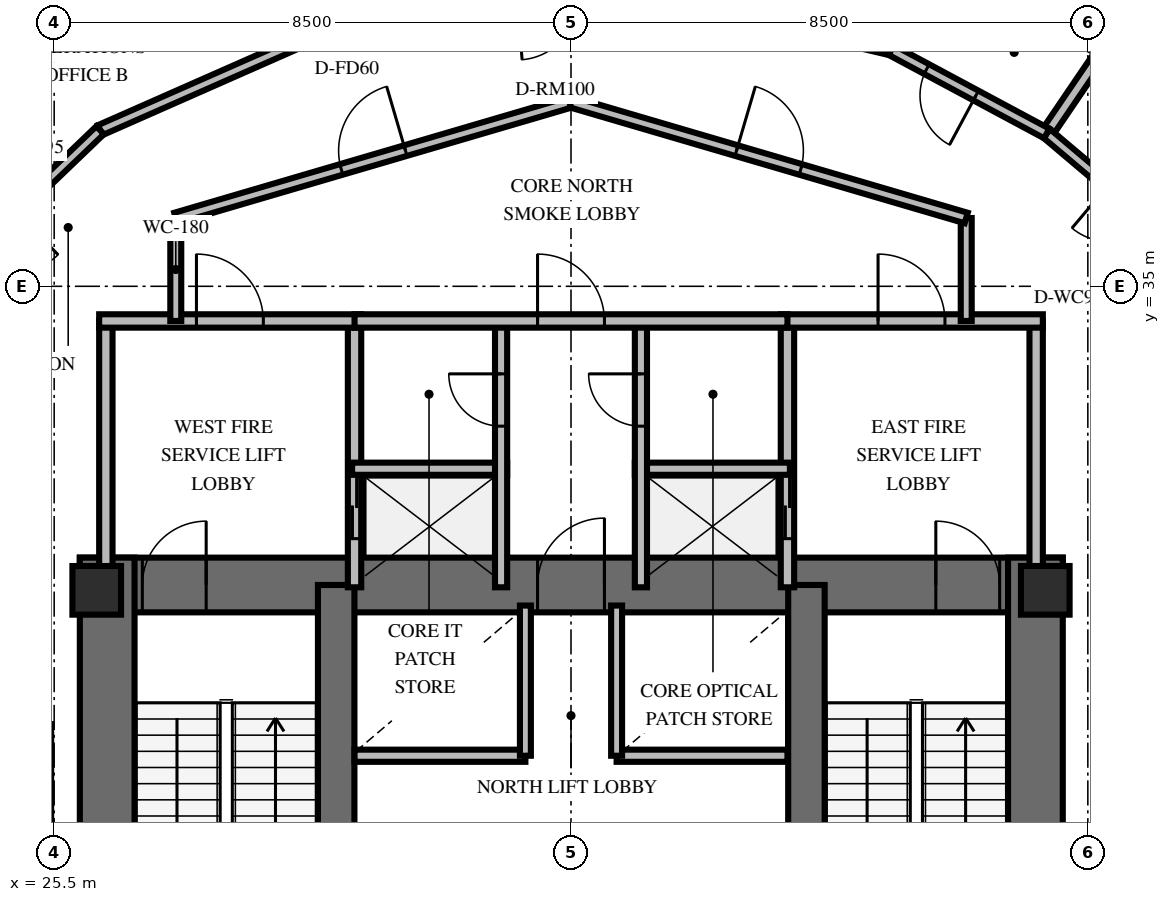
"""IFC4 building model, lengths in metres.
Left out: names, types, materials, properties, quantities, classifications, styles, units other than length and angle.
Written with IfcOpenShell. Run it as: python <this file> out.ifc"""

import sys

from ifc_helpers import new_model, si_unit, direction, frame, frame_2d, origin, origin_2d, place, context, subcontext, project, spatial, rectangle, extrude, element, fill, save


model = new_model("IFC4")
c1 = context("Model", 3, precision=1e-05, world=origin(), true_north=direction((0.0, 1.0)))
c2 = subcontext(c1, "Body", "Model", "MODEL_VIEW")
j1 = project(units=[si_unit("LENGTHUNIT", "METRE"), si_unit("PLANEANGLEUNIT", "RADIAN")], contexts=[c1])
p1 = place(None, origin())
s1 = spatial("IfcSite", under=j1, at=p1, CompositionType="ELEMENT")
p2 = place(p1, origin())
s2 = spatial("IfcBuilding", under=s1, at=p2, CompositionType="ELEMENT")
p3 = place(p2, frame((0.0, 0.0, 46.8)))
s3 = spatial("IfcBuildingStorey", under=s2, at=p3, CompositionType="ELEMENT", Elevation=46.8)
p4 = place(p3, frame((25.922, 30.088, 0.0), z_axis=(0.0, 0.0, 1.0), x_axis=(1.0, 0.0, 0.0)))
e1 = element("IfcWall", 1, at=p4, inside=s3, PredefinedType="SHEAR", context=c2, shape_type="SweptSolid", body=[
    extrude(rectangle(XDim=16.166, YDim=0.9, at=frame_2d((8.083, 0.0))), origin(), (0.0, 0.0, 1.0), 4.2),
])
p5 = place(p4, frame((1.028, 0.0, 0.0)))
e2 = element("IfcOpeningElement", 2, at=p5, cuts=e1, PredefinedType="OPENING", context=c2, shape_type="SweptSolid", body=[
    extrude(rectangle(XDim=1.05, YDim=2.15, at=frame_2d((0.525, 1.075))), frame((0.0, 0.46, 0.0), z_axis=(0.0, -1.0, 0.0), x_axis=(1.0, 0.0, 0.0)), (0.0, 0.0, 1.0), 0.92),
])
p6 = place(p4, frame((14.078, 0.0, 0.0)))
e3 = element("IfcOpeningElement", 3, at=p6, cuts=e1, PredefinedType="OPENING", context=c2, shape_type="SweptSolid", body=[
    extrude(rectangle(XDim=1.05, YDim=2.15, at=frame_2d((0.525, 1.075))), frame((0.0, 0.46, 0.0), z_axis=(0.0, -1.0, 0.0), x_axis=(1.0, 0.0, 0.0)), (0.0, 0.0, 1.0), 0.92),
])
p7 = place(p4, frame((7.528, 0.0, 0.0)))
e4 = element("IfcOpeningElement", 4, at=p7, cuts=e1, PredefinedType="OPENING", context=c2, shape_type="SweptSolid", body=[
    extrude(rectangle(XDim=1.1, YDim=2.15, at=frame_2d((0.55, 1.075))), frame((0.0, 0.46, 0.0), z_axis=(0.0, -1.0, 0.0), x_axis=(1.0, 0.0, 0.0)), (0.0, 0.0, 1.0), 0.92),
])
for number, where, z_axis, x_axis in (
    (5, (26.372, 19.662, 0.0), (0.0, 0.0, 1.0), (0.0, 1.0, 0.0)),
    (6, (41.638, 19.662, 0.0), (0.0, 0.0, 1.0), (0.0, 1.0, 0.0)),
):
    element("IfcWall", number, at=place(p3, frame(where, z_axis=z_axis, x_axis=x_axis)), inside=s3, PredefinedType="SHEAR", context=c2, shape_type="SweptSolid", body=[
        extrude(rectangle(XDim=10.876, YDim=0.9, at=frame_2d((5.438, 0.0))), origin(), (0.0, 0.0, 1.0), 4.2),
    ])
for number, where, z_axis, x_axis in (
    (7, (30.138, 20.112, 0.0), (0.0, 0.0, 1.0), (0.0, 1.0, 0.0)),
    (8, (37.872, 20.112, 0.0), (0.0, 0.0, 1.0), (0.0, 1.0, 0.0)),
):
    element("IfcWall", number, at=place(p3, frame(where, z_axis=z_axis, x_axis=x_axis)), inside=s3, PredefinedType="SHEAR", context=c2, shape_type="SweptSolid", body=[
        extrude(rectangle(XDim=9.976, YDim=0.6, at=frame_2d((4.988, 0.0))), origin(), (0.0, 0.0, 1.0), 4.2),
    ])
for number, where, z_axis, x_axis in (
    (9, (26.2, 30.0, 0.0), (0.0, 0.0, 1.0), (1.0, 0.0, 0.0)),
    (10, (41.8, 30.0, 0.0), (0.0, 0.0, 1.0), (1.0, 0.0, 0.0)),
):
    element("IfcColumn", number, at=place(p3, frame(where, z_axis=z_axis, x_axis=x_axis)), inside=s3, PredefinedType="PILASTER", context=c2, shape_type="SweptSolid", body=[
        extrude(rectangle(XDim=0.8, YDim=0.8, at=origin_2d()), origin(), (0.0, 0.0, 1.0), 4.2),
    ])
p8 = place(p3, frame((26.35, 30.05, 0.0), z_axis=(0.0, 0.0, 1.0), x_axis=(0.0, 1.0, 0.0)))
e11 = element("IfcWall", 11, at=p8, inside=s3, PredefinedType="SOLIDWALL", context=c2, shape_type="SweptSolid", body=[
    extrude(rectangle(XDim=4.38, YDim=0.22, at=frame_2d((2.19, 0.0))), origin(), (0.0, 0.0, 1.0), 3.0),
])
p9 = place(p3, frame((30.44, 30.05, 0.0), z_axis=(0.0, 0.0, 1.0), x_axis=(0.0, 1.0, 0.0)))
e12 = element("IfcWall", 12, at=p9, inside=s3, PredefinedType="SOLIDWALL", context=c2, shape_type="SweptSolid", body=[
    extrude(rectangle(XDim=4.38, YDim=0.22, at=frame_2d((2.19, 0.0))), origin(), (0.0, 0.0, 1.0), 3.0),
])
p10 = place(p9, frame((0.8, 0.0, 0.0)))
e13 = element("IfcOpeningElement", 13, at=p10, cuts=e12, PredefinedType="OPENING", context=c2, shape_type="SweptSolid", body=[
    extrude(rectangle(XDim=1.05, YDim=2.1, at=frame_2d((0.525, 1.05))), frame((0.0, 0.12, 0.0), z_axis=(0.0, -1.0, 0.0), x_axis=(1.0, 0.0, 0.0)), (0.0, 0.0, 1.0), 0.24),
])
p11 = place(p3, frame((26.24, 34.43, 0.0), z_axis=(0.0, 0.0, 1.0), x_axis=(1.0, 0.0, 0.0)))
e14 = element("IfcWall", 14, at=p11, inside=s3, PredefinedType="SOLIDWALL", context=c2, shape_type="SweptSolid", body=[
    extrude(rectangle(XDim=4.31, YDim=0.22, at=frame_2d((2.155, 0.0))), origin(), (0.0, 0.0, 1.0), 3.0),
])
p12 = place(p11, frame((1.6, 0.0, 0.0)))
e15 = element("IfcOpeningElement", 15, at=p12, cuts=e14, PredefinedType="OPENING", context=c2, shape_type="SweptSolid", body=[
    extrude(rectangle(XDim=1.1, YDim=2.15, at=frame_2d((0.55, 1.075))), frame((0.0, 0.12, 0.0), z_axis=(0.0, -1.0, 0.0), x_axis=(1.0, 0.0, 0.0)), (0.0, 0.0, 1.0), 0.24),
])
p13 = place(p3, frame((30.4, 32.0, 0.0), z_axis=(0.0, 0.0, 1.0), x_axis=(1.0, 0.0, 0.0)))
e16 = element("IfcWall", 16, at=p13, inside=s3, PredefinedType="SOLIDWALL", context=c2, shape_type="SweptSolid", body=[
    extrude(rectangle(XDim=2.55, YDim=0.2, at=frame_2d((1.275, 0.0))), origin(), (0.0, 0.0, 1.0), 3.0),
])
p14 = place(p3, frame((32.85, 30.05, 0.0), z_axis=(0.0, 0.0, 1.0), x_axis=(0.0, 1.0, 0.0)))
e17 = element("IfcWall", 17, at=p14, inside=s3, PredefinedType="SOLIDWALL", context=c2, shape_type="SweptSolid", body=[
    extrude(rectangle(XDim=4.38, YDim=0.2, at=frame_2d((2.19, 0.0))), origin(), (0.0, 0.0, 1.0), 3.0),
])
p15 = place(p14, frame((2.65, 0.0, 0.0)))
e18 = element("IfcOpeningElement", 18, at=p15, cuts=e17, PredefinedType="OPENING", context=c2, shape_type="SweptSolid", body=[
    extrude(rectangle(XDim=0.86, YDim=2.05, at=frame_2d((0.43, 1.025))), frame((0.0, 0.11, 0.0), z_axis=(0.0, -1.0, 0.0), x_axis=(1.0, 0.0, 0.0)), (0.0, 0.0, 1.0), 0.22),
])
p16 = place(p3, frame((37.56, 30.05, 0.0), z_axis=(0.0, 0.0, 1.0), x_axis=(0.0, 1.0, 0.0)))
e19 = element("IfcWall", 19, at=p16, inside=s3, PredefinedType="SOLIDWALL", context=c2, shape_type="SweptSolid", body=[
    extrude(rectangle(XDim=4.38, YDim=0.22, at=frame_2d((2.19, 0.0))), origin(), (0.0, 0.0, 1.0), 3.0),
])
p17 = place(p16, frame((0.8, 0.0, 0.0)))
e20 = element("IfcOpeningElement", 20, at=p17, cuts=e19, PredefinedType="OPENING", context=c2, shape_type="SweptSolid", body=[
    extrude(rectangle(XDim=1.05, YDim=2.1, at=frame_2d((0.525, 1.05))), frame((0.0, 0.12, 0.0), z_axis=(0.0, -1.0, 0.0), x_axis=(1.0, 0.0, 0.0)), (0.0, 0.0, 1.0), 0.24),
])
p18 = place(p3, frame((41.65, 30.05, 0.0), z_axis=(0.0, 0.0, 1.0), x_axis=(0.0, 1.0, 0.0)))
e21 = element("IfcWall", 21, at=p18, inside=s3, PredefinedType="SOLIDWALL", context=c2, shape_type="SweptSolid", body=[
    extrude(rectangle(XDim=4.38, YDim=0.22, at=frame_2d((2.19, 0.0))), origin(), (0.0, 0.0, 1.0), 3.0),
])
p19 = place(p3, frame((37.45, 34.43, 0.0), z_axis=(0.0, 0.0, 1.0), x_axis=(1.0, 0.0, 0.0)))
e22 = element("IfcWall", 22, at=p19, inside=s3, PredefinedType="SOLIDWALL", context=c2, shape_type="SweptSolid", body=[
    extrude(rectangle(XDim=4.31, YDim=0.22, at=frame_2d((2.155, 0.0))), origin(), (0.0, 0.0, 1.0), 3.0),
])
p20 = place(p19, frame((1.6, 0.0, 0.0)))
e23 = element("IfcOpeningElement", 23, at=p20, cuts=e22, PredefinedType="OPENING", context=c2, shape_type="SweptSolid", body=[
    extrude(rectangle(XDim=1.1, YDim=2.15, at=frame_2d((0.55, 1.075))), frame((0.0, 0.12, 0.0), z_axis=(0.0, -1.0, 0.0), x_axis=(1.0, 0.0, 0.0)), (0.0, 0.0, 1.0), 0.24),
])
p21 = place(p3, frame((35.05, 32.0, 0.0), z_axis=(0.0, 0.0, 1.0), x_axis=(1.0, 0.0, 0.0)))
e24 = element("IfcWall", 24, at=p21, inside=s3, PredefinedType="SOLIDWALL", context=c2, shape_type="SweptSolid", body=[
    extrude(rectangle(XDim=2.55, YDim=0.2, at=frame_2d((1.275, 0.0))), origin(), (0.0, 0.0, 1.0), 3.0),
])
p22 = place(p3, frame((35.15, 30.05, 0.0), z_axis=(0.0, 0.0, 1.0), x_axis=(0.0, 1.0, 0.0)))
e25 = element("IfcWall", 25, at=p22, inside=s3, PredefinedType="SOLIDWALL", context=c2, shape_type="SweptSolid", body=[
    extrude(rectangle(XDim=4.38, YDim=0.2, at=frame_2d((2.19, 0.0))), origin(), (0.0, 0.0, 1.0), 3.0),
])
p23 = place(p22, frame((2.65, 0.0, 0.0)))
e26 = element("IfcOpeningElement", 26, at=p23, cuts=e25, PredefinedType="OPENING", context=c2, shape_type="SweptSolid", body=[
    extrude(rectangle(XDim=0.86, YDim=2.05, at=frame_2d((0.43, 1.025))), frame((0.0, 0.11, 0.0), z_axis=(0.0, -1.0, 0.0), x_axis=(1.0, 0.0, 0.0)), (0.0, 0.0, 1.0), 0.22),
])
p24 = place(p3, frame((30.44, 34.43, 0.0), z_axis=(0.0, 0.0, 1.0), x_axis=(1.0, 0.0, 0.0)))
e27 = element("IfcWall", 27, at=p24, inside=s3, PredefinedType="SOLIDWALL", context=c2, shape_type="SweptSolid", body=[
    extrude(rectangle(XDim=7.12, YDim=0.22, at=frame_2d((3.56, 0.0))), origin(), (0.0, 0.0, 1.0), 3.0),
])
p25 = place(p24, frame((3.01, 0.0, 0.0)))
e28 = element("IfcOpeningElement", 28, at=p25, cuts=e27, PredefinedType="OPENING", context=c2, shape_type="SweptSolid", body=[
    extrude(rectangle(XDim=1.1, YDim=2.15, at=frame_2d((0.55, 1.075))), frame((0.0, 0.12, 0.0), z_axis=(0.0, -1.0, 0.0), x_axis=(1.0, 0.0, 0.0)), (0.0, 0.0, 1.0), 0.24),
])
p26 = place(p3, frame((30.44, 27.28, 0.0), z_axis=(0.0, 0.0, 1.0), x_axis=(1.0, 0.0, 0.0)))
e29 = element("IfcWall", 29, at=p26, inside=s3, PredefinedType="SOLIDWALL", context=c2, shape_type="SweptSolid", body=[
    extrude(rectangle(XDim=2.81, YDim=0.2, at=frame_2d((1.405, 0.0))), origin(), (0.0, 0.0, 1.0), 3.0),
])
p27 = place(p3, frame((33.25, 27.28, 0.0), z_axis=(0.0, 0.0, 1.0), x_axis=(0.0, 1.0, 0.0)))
e30 = element("IfcWall", 30, at=p27, inside=s3, PredefinedType="SOLIDWALL", context=c2, shape_type="SweptSolid", body=[
    extrude(rectangle(XDim=2.47, YDim=0.18, at=frame_2d((1.235, 0.0))), origin(), (0.0, 0.0, 1.0), 3.0),
])
p28 = place(p3, frame((34.75, 27.28, 0.0), z_axis=(0.0, 0.0, 1.0), x_axis=(1.0, 0.0, 0.0)))
e31 = element("IfcWall", 31, at=p28, inside=s3, PredefinedType="SOLIDWALL", context=c2, shape_type="SweptSolid", body=[
    extrude(rectangle(XDim=2.81, YDim=0.2, at=frame_2d((1.405, 0.0))), origin(), (0.0, 0.0, 1.0), 3.0),
])
p29 = place(p3, frame((34.75, 27.28, 0.0), z_axis=(0.0, 0.0, 1.0), x_axis=(0.0, 1.0, 0.0)))
e32 = element("IfcWall", 32, at=p29, inside=s3, PredefinedType="SOLIDWALL", context=c2, shape_type="SweptSolid", body=[
    extrude(rectangle(XDim=2.47, YDim=0.18, at=frame_2d((1.235, 0.0))), origin(), (0.0, 0.0, 1.0), 3.0),
])
for number, where, z_axis, x_axis in (
    (33, (27.5, 34.43, 0.0), (0.0, 0.0, 1.0), (0.0, 1.0, 0.0)),
    (34, (40.5, 36.123, 0.0), (0.0, 0.0, 1.0), (0.0, -1.0, 0.0)),
):
    element("IfcWall", number, at=place(p3, frame(where, z_axis=z_axis, x_axis=x_axis)), inside=s3, PredefinedType="PARTITIONING", context=c2, shape_type="SweptSolid", body=[
        extrude(rectangle(XDim=1.693, YDim=0.18, at=frame_2d((0.846, 0.0))), origin(), (0.0, 0.0, 1.0), 3.0),
    ])
p30 = place(p3, frame((27.5, 36.123, 0.0), z_axis=(0.0, 0.0, 1.0), x_axis=(0.959546654541, 0.281549671923, 0.0)))
e35 = element("IfcWall", 35, at=p30, inside=s3, PredefinedType="PARTITIONING", context=c2, shape_type="SweptSolid", body=[
    extrude(rectangle(XDim=6.774, YDim=0.18, at=frame_2d((3.387, 0.0))), origin(), (0.0, 0.0, 1.0), 3.0),
])
p31 = place(p30, frame((2.837, 0.0, 0.0)))
e36 = element("IfcOpeningElement", 36, at=p31, cuts=e35, PredefinedType="OPENING", context=c2, shape_type="SweptSolid", body=[
    extrude(rectangle(XDim=1.1, YDim=2.15, at=frame_2d((0.55, 1.075))), frame((0.0, 0.1, 0.0), z_axis=(0.0, -1.0, 0.0), x_axis=(1.0, 0.0, 0.0)), (0.0, 0.0, 1.0), 0.2),
])
p32 = place(p3, frame((34.0, 38.03, 0.0), z_axis=(0.0, 0.0, 1.0), x_axis=(0.959546654541, -0.281549671923, 0.0)))
e37 = element("IfcWall", 37, at=p32, inside=s3, PredefinedType="PARTITIONING", context=c2, shape_type="SweptSolid", body=[
    extrude(rectangle(XDim=6.774, YDim=0.18, at=frame_2d((3.387, 0.0))), origin(), (0.0, 0.0, 1.0), 3.0),
])
p33 = place(p32, frame((2.837, 0.0, 0.0)))
e38 = element("IfcOpeningElement", 38, at=p33, cuts=e37, PredefinedType="OPENING", context=c2, shape_type="SweptSolid", body=[
    extrude(rectangle(XDim=1.1, YDim=2.15, at=frame_2d((0.55, 1.075))), frame((0.0, 0.1, 0.0), z_axis=(0.0, -1.0, 0.0), x_axis=(1.0, 0.0, 0.0)), (0.0, 0.0, 1.0), 0.2),
])
p34 = place(p3, frame((41.824, 37.513, 0.0), z_axis=(0.0, 0.0, 1.0), x_axis=(0.562087418508, 0.827077828233, 0.0)))
e39 = element("IfcWall", 39, at=p34, inside=s3, PredefinedType="PLUMBINGWALL", context=c2, shape_type="SweptSolid", body=[
    extrude(rectangle(XDim=1.65, YDim=0.2, at=frame_2d((0.825, 0.0))), origin(), (0.0, 0.0, 1.0), 3.0),
])
p35 = place(p3, frame((44.047, 35.635, 0.0), z_axis=(0.0, 0.0, 1.0), x_axis=(-0.763774375934, 0.645483309363, 0.0)))
e40 = element("IfcWall", 40, at=p35, inside=s3, PredefinedType="PARTITIONING", context=c2, shape_type="SweptSolid", body=[
    extrude(rectangle(XDim=2.91, YDim=0.18, at=frame_2d((1.455, 0.0))), origin(), (0.0, 0.0, 1.0), 3.0),
])
p36 = place(p35, frame((0.669, 0.0, 0.0)))
e41 = element("IfcOpeningElement", 41, at=p36, cuts=e40, PredefinedType="OPENING", context=c2, shape_type="SweptSolid", body=[
    extrude(rectangle(XDim=0.92, YDim=2.1, at=frame_2d((0.46, 1.05))), frame((0.0, 0.1, 0.0), z_axis=(0.0, -1.0, 0.0), x_axis=(1.0, 0.0, 0.0)), (0.0, 0.0, 1.0), 0.2),
])
p37 = place(p3, frame((42.752, 38.878, 0.0), z_axis=(0.0, 0.0, 1.0), x_axis=(-0.881312658049, 0.47253359538, 0.0)))
e42 = element("IfcWall", 42, at=p37, inside=s3, PredefinedType="PLUMBINGWALL", context=c2, shape_type="SweptSolid", body=[
    extrude(rectangle(XDim=3.255, YDim=0.2, at=frame_2d((1.627, 0.0))), origin(), (0.0, 0.0, 1.0), 3.0),
])
p38 = place(p3, frame((41.824, 37.513, 0.0), z_axis=(0.0, 0.0, 1.0), x_axis=(-0.881294073776, 0.472568254887, 0.0)))
e43 = element("IfcWall", 43, at=p38, inside=s3, PredefinedType="PARTITIONING", context=c2, shape_type="SweptSolid", body=[
    extrude(rectangle(XDim=2.91, YDim=0.18, at=frame_2d((1.455, 0.0))), origin(), (0.0, 0.0, 1.0), 3.0),
])
p39 = place(p38, frame((1.321, 0.0, 0.0)))
e44 = element("IfcOpeningElement", 44, at=p39, cuts=e43, PredefinedType="OPENING", context=c2, shape_type="SweptSolid", body=[
    extrude(rectangle(XDim=0.92, YDim=2.1, at=frame_2d((0.46, 1.05))), frame((0.0, 0.1, 0.0), z_axis=(0.0, -1.0, 0.0), x_axis=(1.0, 0.0, 0.0)), (0.0, 0.0, 1.0), 0.2),
])
p40 = place(p3, frame((39.26, 38.888, 0.0), z_axis=(0.0, 0.0, 1.0), x_axis=(-0.973583801544, 0.228329983514, 0.0)))
e45 = element("IfcWall", 45, at=p40, inside=s3, PredefinedType="PARTITIONING", context=c2, shape_type="SweptSolid", body=[
    extrude(rectangle(XDim=4.355, YDim=0.18, at=frame_2d((2.177, 0.0))), origin(), (0.0, 0.0, 1.0), 3.0),
])
p41 = place(p3, frame((30.68, 39.518, 0.0), z_axis=(0.0, 0.0, 1.0), x_axis=(-0.914959483899, -0.403545713425, 0.0)))
e46 = element("IfcWall", 46, at=p41, inside=s3, PredefinedType="PARTITIONING", context=c2, shape_type="SweptSolid", body=[
    extrude(rectangle(XDim=4.834, YDim=0.18, at=frame_2d((2.417, 0.0))), origin(), (0.0, 0.0, 1.0), 3.0),
])
p42 = place(p3, frame((26.256, 37.567, 0.0), z_axis=(0.0, 0.0, 1.0), x_axis=(-0.721748503055, -0.692155400425, 0.0)))
e47 = element("IfcWall", 47, at=p42, inside=s3, PredefinedType="PARTITIONING", context=c2, shape_type="SweptSolid", body=[
    extrude(rectangle(XDim=4.834, YDim=0.18, at=frame_2d((2.417, 0.0))), origin(), (0.0, 0.0, 1.0), 3.0),
])
p43 = place(p42, frame((1.917, 0.0, 0.0)))
e48 = element("IfcOpeningElement", 48, at=p43, cuts=e47, PredefinedType="OPENING", context=c2, shape_type="SweptSolid", body=[
    extrude(rectangle(XDim=1.0, YDim=2.15, at=frame_2d((0.5, 1.075))), frame((0.0, 0.1, 0.0), z_axis=(0.0, -1.0, 0.0), x_axis=(1.0, 0.0, 0.0)), (0.0, 0.0, 1.0), 0.2),
])
p44 = place(p5, origin())
e49 = element("IfcDoor", 49, at=p44, inside=s3, OperationType="SINGLE_SWING_RIGHT", PredefinedType="DOOR", context=c2, shape_type="SweptSolid", body=[
    extrude(rectangle(XDim=1.05, YDim=2.15, at=frame_2d((0.525, 1.075))), frame((0.0, 0.025, 0.0), z_axis=(0.0, -1.0, 0.0), x_axis=(1.0, 0.0, 0.0)), (0.0, 0.0, 1.0), 0.05),
])
fill(e2, e49)
p45 = place(p6, origin())
e50 = element("IfcDoor", 50, at=p45, inside=s3, OperationType="SINGLE_SWING_LEFT", PredefinedType="DOOR", context=c2, shape_type="SweptSolid", body=[
    extrude(rectangle(XDim=1.05, YDim=2.15, at=frame_2d((0.525, 1.075))), frame((0.0, 0.025, 0.0), z_axis=(0.0, -1.0, 0.0), x_axis=(1.0, 0.0, 0.0)), (0.0, 0.0, 1.0), 0.05),
])
fill(e3, e50)
p46 = place(p7, origin())
e51 = element("IfcDoor", 51, at=p46, inside=s3, OperationType="SINGLE_SWING_RIGHT", PredefinedType="DOOR", context=c2, shape_type="SweptSolid", body=[
    extrude(rectangle(XDim=1.1, YDim=2.15, at=frame_2d((0.55, 1.075))), frame((0.0, 0.025, 0.0), z_axis=(0.0, -1.0, 0.0), x_axis=(1.0, 0.0, 0.0)), (0.0, 0.0, 1.0), 0.05),
])
fill(e4, e51)
p47 = place(p12, origin())
e52 = element("IfcDoor", 52, at=p47, inside=s3, OperationType="SINGLE_SWING_LEFT", PredefinedType="DOOR", context=c2, shape_type="SweptSolid", body=[
    extrude(rectangle(XDim=1.1, YDim=2.15, at=frame_2d((0.55, 1.075))), frame((0.0, 0.025, 0.0), z_axis=(0.0, -1.0, 0.0), x_axis=(1.0, 0.0, 0.0)), (0.0, 0.0, 1.0), 0.05),
])
fill(e15, e52)
p48 = place(p10, origin())
e53 = element("IfcDoor", 53, at=p48, inside=s3, OperationType="DOUBLE_DOOR_SLIDING", PredefinedType="USERDEFINED", context=c2, shape_type="SweptSolid", body=[
    extrude(rectangle(XDim=1.05, YDim=2.1, at=frame_2d((0.525, 1.05))), frame((0.0, 0.025, 0.0), z_axis=(0.0, -1.0, 0.0), x_axis=(1.0, 0.0, 0.0)), (0.0, 0.0, 1.0), 0.05),
])
fill(e13, e53)
p49 = place(p15, origin())
e54 = element("IfcDoor", 54, at=p49, inside=s3, OperationType="SINGLE_SWING_RIGHT", PredefinedType="TRAPDOOR", context=c2, shape_type="SweptSolid", body=[
    extrude(rectangle(XDim=0.86, YDim=2.05, at=frame_2d((0.43, 1.025))), frame((0.0, 0.025, 0.0), z_axis=(0.0, -1.0, 0.0), x_axis=(1.0, 0.0, 0.0)), (0.0, 0.0, 1.0), 0.05),
])
fill(e18, e54)
p50 = place(p20, origin())
e55 = element("IfcDoor", 55, at=p50, inside=s3, OperationType="SINGLE_SWING_LEFT", PredefinedType="DOOR", context=c2, shape_type="SweptSolid", body=[
    extrude(rectangle(XDim=1.1, YDim=2.15, at=frame_2d((0.55, 1.075))), frame((0.0, 0.025, 0.0), z_axis=(0.0, -1.0, 0.0), x_axis=(1.0, 0.0, 0.0)), (0.0, 0.0, 1.0), 0.05),
])
fill(e23, e55)
p51 = place(p17, origin())
e56 = element("IfcDoor", 56, at=p51, inside=s3, OperationType="DOUBLE_DOOR_SLIDING", PredefinedType="USERDEFINED", context=c2, shape_type="SweptSolid", body=[
    extrude(rectangle(XDim=1.05, YDim=2.1, at=frame_2d((0.525, 1.05))), frame((0.0, 0.025, 0.0), z_axis=(0.0, -1.0, 0.0), x_axis=(1.0, 0.0, 0.0)), (0.0, 0.0, 1.0), 0.05),
])
fill(e20, e56)
p52 = place(p23, origin())
e57 = element("IfcDoor", 57, at=p52, inside=s3, OperationType="SINGLE_SWING_RIGHT", PredefinedType="TRAPDOOR", context=c2, shape_type="SweptSolid", body=[
    extrude(rectangle(XDim=0.86, YDim=2.05, at=frame_2d((0.43, 1.025))), frame((0.0, 0.025, 0.0), z_axis=(0.0, -1.0, 0.0), x_axis=(1.0, 0.0, 0.0)), (0.0, 0.0, 1.0), 0.05),
])
fill(e26, e57)
p53 = place(p25, origin())
e58 = element("IfcDoor", 58, at=p53, inside=s3, OperationType="SINGLE_SWING_LEFT", PredefinedType="DOOR", context=c2, shape_type="SweptSolid", body=[
    extrude(rectangle(XDim=1.1, YDim=2.15, at=frame_2d((0.55, 1.075))), frame((0.0, 0.025, 0.0), z_axis=(0.0, -1.0, 0.0), x_axis=(1.0, 0.0, 0.0)), (0.0, 0.0, 1.0), 0.05),
])
fill(e28, e58)
p54 = place(p31, origin())
e59 = element("IfcDoor", 59, at=p54, inside=s3, OperationType="SINGLE_SWING_RIGHT", PredefinedType="DOOR", context=c2, shape_type="SweptSolid", body=[
    extrude(rectangle(XDim=1.1, YDim=2.15, at=frame_2d((0.55, 1.075))), frame((0.0, 0.025, 0.0), z_axis=(0.0, -1.0, 0.0), x_axis=(1.0, 0.0, 0.0)), (0.0, 0.0, 1.0), 0.05),
])
fill(e36, e59)
p55 = place(p33, origin())
e60 = element("IfcDoor", 60, at=p55, inside=s3, OperationType="SINGLE_SWING_LEFT", PredefinedType="DOOR", context=c2, shape_type="SweptSolid", body=[
    extrude(rectangle(XDim=1.1, YDim=2.15, at=frame_2d((0.55, 1.075))), frame((0.0, 0.025, 0.0), z_axis=(0.0, -1.0, 0.0), x_axis=(1.0, 0.0, 0.0)), (0.0, 0.0, 1.0), 0.05),
])
fill(e38, e60)
p56 = place(p39, origin())
e61 = element("IfcDoor", 61, at=p56, inside=s3, OperationType="SINGLE_SWING_LEFT", PredefinedType="DOOR", context=c2, shape_type="SweptSolid", body=[
    extrude(rectangle(XDim=0.92, YDim=2.1, at=frame_2d((0.46, 1.05))), frame((0.0, 0.025, 0.0), z_axis=(0.0, -1.0, 0.0), x_axis=(1.0, 0.0, 0.0)), (0.0, 0.0, 1.0), 0.05),
])
fill(e44, e61)
save(model, sys.argv[1])
